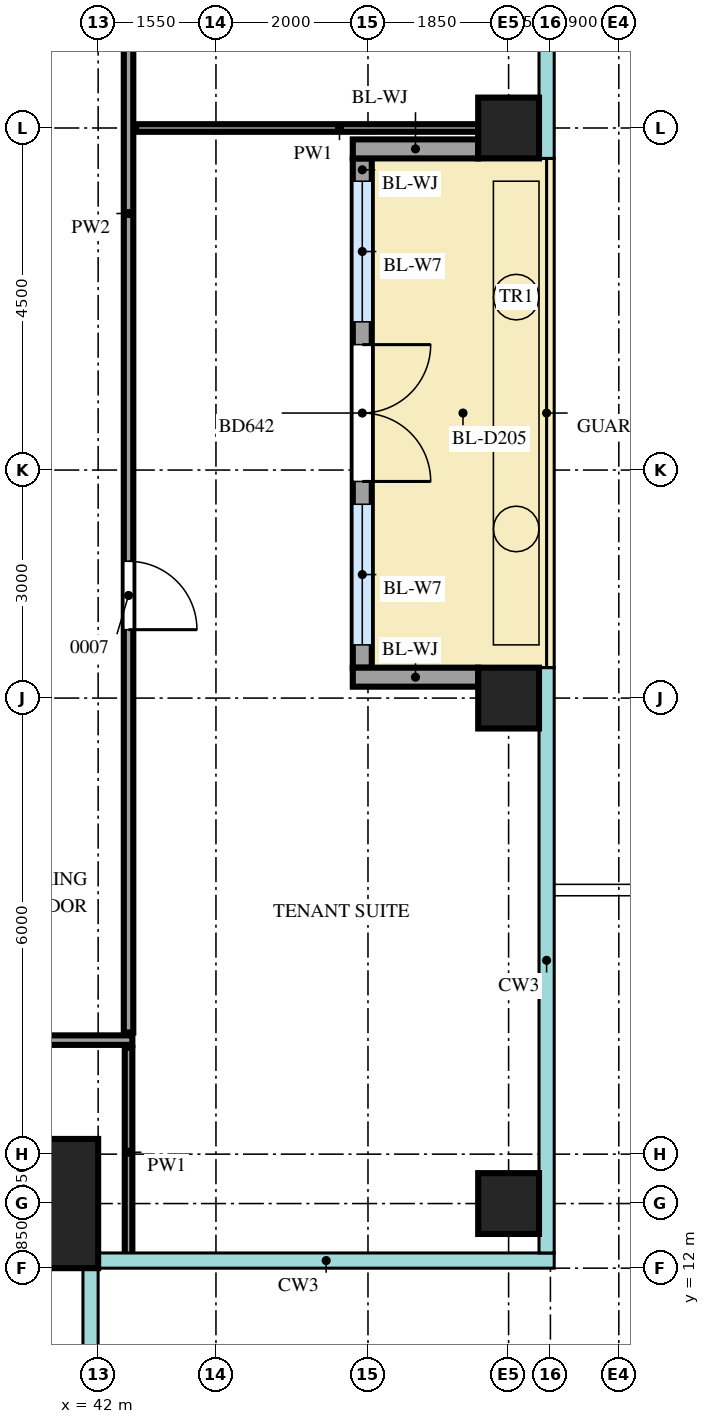
"""IFC4 building model, lengths in metres.
Left out: names, types, materials, properties, quantities, classifications, styles, units other than length and angle.
Written with IfcOpenShell. Run it as: python <this file> out.ifc"""

import sys

from ifc_helpers import new_model, si_unit, direction, frame, frame_2d, origin, origin_2d, place, context, subcontext, project, spatial, rectangle, extrude, source, transform, mapped, element, fill, save


model = new_model("IFC4")
c1 = context("Model", 3, precision=1e-05, world=origin(), true_north=direction((0.0, 1.0)))
c2 = subcontext(c1, "Body", "Model", "MODEL_VIEW")
j1 = project(units=[si_unit("LENGTHUNIT", "METRE"), si_unit("PLANEANGLEUNIT", "RADIAN")], contexts=[c1])
p1 = place(None, origin())
s1 = spatial("IfcSite", under=j1, at=p1, CompositionType="ELEMENT")
p2 = place(p1, origin())
s2 = spatial("IfcBuilding", under=s1, at=p2, CompositionType="ELEMENT")
p3 = place(p2, frame((0.0, 0.0, 286.2)))
s3 = spatial("IfcBuildingStorey", under=s2, at=p3, CompositionType="ELEMENT", Elevation=286.2)
m1 = source(origin(), c2, "Body", "SweptSolid", [
    extrude(rectangle(XDim=1.7, YDim=1.7, at=origin_2d()), origin(), (0.0, 0.0, 1.0), 3.75),
])
p4 = place(p3, frame((41.15, 12.85, 0.0), z_axis=(0.0, 0.0, 1.0), x_axis=(1.0, 0.0, 0.0)))
e1 = element("IfcColumn", 1, at=p4, inside=s3, PredefinedType="COLUMN", context=c2, shape_type="MappedRepresentation", body=[
    mapped(m1, transform((0.0, 0.0, 0.0))),
])
m2 = source(origin(), c2, "Body", "SweptSolid", [
    extrude(rectangle(XDim=0.8, YDim=0.8, at=origin_2d()), origin(), (0.0, 0.0, 1.0), 3.75),
])
for number, where, z_axis, x_axis in (
    (2, (47.4, 12.85, 0.0), (0.0, 0.0, 1.0), (1.0, 0.0, 0.0)),
    (3, (47.4, 19.5, 0.0), (0.0, 0.0, 1.0), (1.0, 0.0, 0.0)),
    (4, (47.4, 27.0, 0.0), (0.0, 0.0, 1.0), (1.0, 0.0, 0.0)),
):
    element("IfcColumn", number, at=place(p3, frame(where, z_axis=z_axis, x_axis=x_axis)), inside=s3, PredefinedType="COLUMN", context=c2, shape_type="MappedRepresentation", body=[
        mapped(m2, transform((0.0, 0.0, 0.0))),
    ])
m3 = source(origin(), c2, "Body", "SweptSolid", [
    extrude(rectangle(XDim=6.7, YDim=0.25, at=frame_2d((3.35, 0.0))), origin(), (0.0, 0.0, 1.0), 3.2),
])
p5 = place(p3, frame((45.475, 19.9, 0.0), z_axis=(0.0, 0.0, 1.0), x_axis=(0.0, 1.0, 0.0)))
e5 = element("IfcWall", 5, at=p5, inside=s3, PredefinedType="SOLIDWALL", context=c2, shape_type="MappedRepresentation", body=[
    mapped(m3, transform((0.0, 0.0, 0.0))),
])
m4 = source(origin(), c2, "Body", "SweptSolid", [
    extrude(rectangle(XDim=1.85, YDim=2.4, at=frame_2d((0.925, 1.2))), frame((0.0, 0.135, 0.0), z_axis=(0.0, -1.0, 0.0), x_axis=(1.0, 0.0, 0.0)), (0.0, 0.0, 1.0), 0.27),
])
p6 = place(p5, frame((0.3, 0.0, 0.0)))
e6 = element("IfcOpeningElement", 6, at=p6, cuts=e5, PredefinedType="OPENING", context=c2, shape_type="MappedRepresentation", body=[
    mapped(m4, transform((0.0, 0.0, 0.0))),
])
p7 = place(p5, frame((4.55, 0.0, 0.0)))
e7 = element("IfcOpeningElement", 7, at=p7, cuts=e5, PredefinedType="OPENING", context=c2, shape_type="MappedRepresentation", body=[
    mapped(m4, transform((0.0, 0.0, 0.0))),
])
m5 = source(origin(), c2, "Body", "SweptSolid", [
    extrude(rectangle(XDim=1.8, YDim=2.4, at=frame_2d((0.9, 1.2))), frame((0.0, 0.135, 0.0), z_axis=(0.0, -1.0, 0.0), x_axis=(1.0, 0.0, 0.0)), (0.0, 0.0, 1.0), 0.27),
])
p8 = place(p5, frame((2.45, 0.0, 0.0)))
e8 = element("IfcOpeningElement", 8, at=p8, cuts=e5, PredefinedType="OPENING", context=c2, shape_type="MappedRepresentation", body=[
    mapped(m5, transform((0.0, 0.0, 0.0))),
])
m6 = source(origin(), c2, "Body", "SweptSolid", [
    extrude(rectangle(XDim=1.65, YDim=0.25, at=frame_2d((0.825, 0.0))), origin(), (0.0, 0.0, 1.0), 3.2),
])
for number, where, z_axis, x_axis in (
    (9, (47.0, 19.775, 0.0), (0.0, 0.0, 1.0), (-1.0, 0.0, 0.0)),
    (10, (47.0, 26.725, 0.0), (0.0, 0.0, 1.0), (-1.0, 0.0, 0.0)),
):
    element("IfcWall", number, at=place(p3, frame(where, z_axis=z_axis, x_axis=x_axis)), inside=s3, PredefinedType="SOLIDWALL", context=c2, shape_type="MappedRepresentation", body=[
        mapped(m6, transform((0.0, 0.0, 0.0))),
    ])
m7 = source(origin(), c2, "Body", "SweptSolid", [
    extrude(rectangle(XDim=2.75, YDim=0.1, at=frame_2d((1.375, 0.0))), origin(), (0.0, 0.0, 1.0), 3.8),
])
p9 = place(p3, frame((42.4, 12.15, 0.0), z_axis=(0.0, 0.0, 1.0), x_axis=(0.0, 1.0, 0.0)))
e11 = element("IfcWall", 11, at=p9, inside=s3, PredefinedType="PARTITIONING", context=c2, shape_type="MappedRepresentation", body=[
    mapped(m7, transform((0.0, 0.0, 0.0))),
])
m8 = source(origin(), c2, "Body", "SweptSolid", [
    extrude(rectangle(XDim=19.1, YDim=0.125, at=frame_2d((9.55, 0.0))), origin(), (0.0, 0.0, 1.0), 3.8),
])
p10 = place(p3, frame((23.35, 15.0, 0.0), z_axis=(0.0, 0.0, 1.0), x_axis=(1.0, 0.0, 0.0)))
e12 = element("IfcWall", 12, at=p10, inside=s3, PredefinedType="PARTITIONING", context=c2, shape_type="MappedRepresentation", body=[
    mapped(m8, transform((0.0, 0.0, 0.0))),
])
m9 = source(origin(), c2, "Body", "SweptSolid", [
    extrude(rectangle(XDim=0.9, YDim=2.1, at=frame_2d((0.45, 1.05))), frame((0.0, 0.073, 0.0), z_axis=(0.0, -1.0, 0.0), x_axis=(1.0, 0.0, 0.0)), (0.0, 0.0, 1.0), 0.145),
])
p11 = place(p10, frame((7.1, 0.0, 0.0)))
e13 = element("IfcOpeningElement", 13, at=p11, cuts=e12, PredefinedType="OPENING", context=c2, shape_type="MappedRepresentation", body=[
    mapped(m9, transform((0.0, 0.0, 0.0))),
])
p12 = place(p10, frame((13.3, 0.0, 0.0)))
e14 = element("IfcOpeningElement", 14, at=p12, cuts=e12, PredefinedType="OPENING", context=c2, shape_type="MappedRepresentation", body=[
    mapped(m9, transform((0.0, 0.0, 0.0))),
])
m10 = source(origin(), c2, "Body", "SweptSolid", [
    extrude(rectangle(XDim=23.8, YDim=0.125, at=frame_2d((11.9, 0.0))), origin(), (0.0, 0.0, 1.0), 3.8),
])
p13 = place(p3, frame((42.4, 15.1, 0.0), z_axis=(0.0, 0.0, 1.0), x_axis=(0.0, 1.0, 0.0)))
e15 = element("IfcWall", 15, at=p13, inside=s3, PredefinedType="PARTITIONING", context=c2, shape_type="MappedRepresentation", body=[
    mapped(m10, transform((0.0, 0.0, 0.0))),
])
p14 = place(p13, frame((5.3, 0.0, 0.0)))
e16 = element("IfcOpeningElement", 16, at=p14, cuts=e15, PredefinedType="OPENING", context=c2, shape_type="MappedRepresentation", body=[
    mapped(m9, transform((0.0, 0.0, 0.0))),
])
p15 = place(p13, frame((15.35, 0.0, 0.0)))
e17 = element("IfcOpeningElement", 17, at=p15, cuts=e15, PredefinedType="OPENING", context=c2, shape_type="MappedRepresentation", body=[
    mapped(m9, transform((0.0, 0.0, 0.0))),
])
p16 = place(p13, frame((21.05, 0.0, 0.0)))
e18 = element("IfcOpeningElement", 18, at=p16, cuts=e15, PredefinedType="OPENING", context=c2, shape_type="MappedRepresentation", body=[
    mapped(m9, transform((0.0, 0.0, 0.0))),
])
m11 = source(origin(), c2, "Body", "SweptSolid", [
    extrude(rectangle(XDim=5.35, YDim=0.1, at=frame_2d((2.675, 0.0))), origin(), (0.0, 0.0, 1.0), 3.8),
])
p17 = place(p3, frame((42.5, 27.0, 0.0), z_axis=(0.0, 0.0, 1.0), x_axis=(1.0, 0.0, 0.0)))
e19 = element("IfcWall", 19, at=p17, inside=s3, PredefinedType="PARTITIONING", context=c2, shape_type="MappedRepresentation", body=[
    mapped(m11, transform((0.0, 0.0, 0.0))),
])
m12 = source(origin(), c2, "Body", "SweptSolid", [
    extrude(rectangle(XDim=1.85, YDim=2.4, at=frame_2d((0.925, 1.2))), frame((0.0, 0.03, 0.0), z_axis=(0.0, -1.0, 0.0), x_axis=(1.0, 0.0, 0.0)), (0.0, 0.0, 1.0), 0.06),
])
p18 = place(p6, origin())
e20 = element("IfcWindow", 20, at=p18, inside=s3, PartitioningType="SINGLE_PANEL", PredefinedType="WINDOW", context=c2, shape_type="MappedRepresentation", body=[
    mapped(m12, transform((0.0, 0.0, 0.0))),
])
fill(e6, e20)
p19 = place(p7, origin())
e21 = element("IfcWindow", 21, at=p19, inside=s3, PartitioningType="SINGLE_PANEL", PredefinedType="WINDOW", context=c2, shape_type="MappedRepresentation", body=[
    mapped(m12, transform((0.0, 0.0, 0.0))),
])
fill(e7, e21)
m13 = source(origin(), c2, "Body", "SweptSolid", [
    extrude(rectangle(XDim=1.8, YDim=2.4, at=frame_2d((0.9, 1.2))), frame((0.0, 0.025, 0.0), z_axis=(0.0, -1.0, 0.0), x_axis=(1.0, 0.0, 0.0)), (0.0, 0.0, 1.0), 0.05),
])
p20 = place(p8, origin())
e22 = element("IfcDoor", 22, at=p20, inside=s3, OperationType="DOUBLE_DOOR_DOUBLE_SWING", PredefinedType="DOOR", context=c2, shape_type="MappedRepresentation", body=[
    mapped(m13, transform((0.0, 0.0, 0.0))),
])
fill(e8, e22)
m14 = source(origin(), c2, "Body", "SweptSolid", [
    extrude(rectangle(XDim=0.9, YDim=2.1, at=frame_2d((0.45, 1.05))), frame((0.0, 0.025, 0.0), z_axis=(0.0, -1.0, 0.0), x_axis=(1.0, 0.0, 0.0)), (0.0, 0.0, 1.0), 0.05),
])
p21 = place(p14, origin())
e23 = element("IfcDoor", 23, at=p21, inside=s3, OperationType="SINGLE_SWING_LEFT", PredefinedType="DOOR", context=c2, shape_type="MappedRepresentation", body=[
    mapped(m14, transform((0.0, 0.0, 0.0))),
])
fill(e16, e23)
save(model, sys.argv[1])
